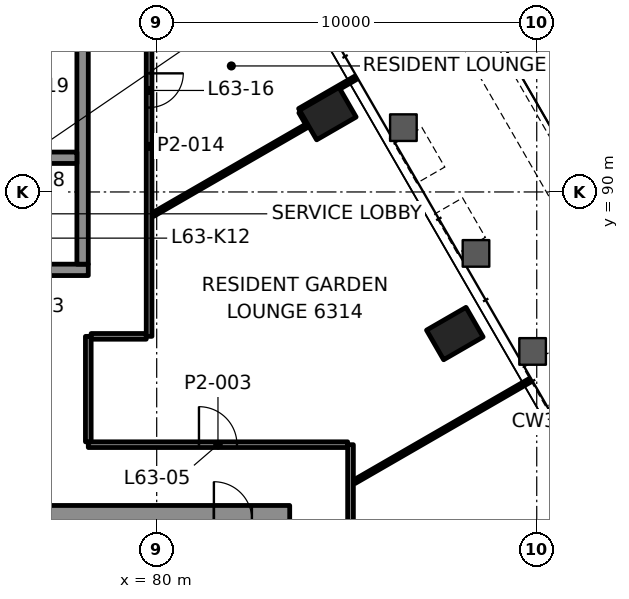
"""IFC4 building model, lengths in metres.
Left out: names, types, materials, properties, quantities, classifications, styles, units other than length and angle.
Written with IfcOpenShell. Run it as: python <this file> out.ifc"""

import sys

from ifc_helpers import new_model, si_unit, direction, frame, frame_2d, origin, origin_2d, place, context, subcontext, project, spatial, rectangle, hollow_rectangle, extrude, element, fill, save


model = new_model("IFC4")
c1 = context("Model", 3, precision=1e-05, world=origin(), true_north=direction((0.0, 1.0)))
c2 = subcontext(c1, "Body", "Model", "MODEL_VIEW")
j1 = project(units=[si_unit("LENGTHUNIT", "METRE"), si_unit("PLANEANGLEUNIT", "RADIAN")], contexts=[c1])
p1 = place(None, origin())
s1 = spatial("IfcSite", under=j1, at=p1, CompositionType="ELEMENT")
p2 = place(p1, origin())
s2 = spatial("IfcBuilding", under=s1, at=p2, CompositionType="ELEMENT")
p3 = place(p2, frame((0.0, 0.0, 267.1)))
s3 = spatial("IfcBuildingStorey", under=s2, at=p3, CompositionType="ELEMENT", Elevation=267.1)
for number, where, z_axis, x_axis in (
    (1, (87.844, 86.274, -0.0), (0.0, 0.0, 1.0), (-0.5, 0.866, 0.0)),
    (2, (84.503, 92.062, -0.0), (0.0, 0.0, 1.0), (-0.5, 0.866, 0.0)),
):
    element("IfcColumn", number, at=place(p3, frame(where, z_axis=z_axis, x_axis=x_axis)), inside=s3, PredefinedType="COLUMN", context=c2, shape_type="SweptSolid", body=[
        extrude(hollow_rectangle(XDim=0.9, YDim=1.2, WallThickness=0.06, at=origin_2d()), origin(), (0.0, 0.0, 1.0), 3.5),
    ])
p4 = place(p3, frame((66.5, 81.375, 0.0), z_axis=(0.0, 0.0, 1.0), x_axis=(1.0, 0.0, 0.0)))
e3 = element("IfcWall", 3, at=p4, inside=s3, PredefinedType="SHEAR", context=c2, shape_type="SweptSolid", body=[
    extrude(rectangle(XDim=17.0, YDim=0.75, at=frame_2d((8.5, 0.0))), origin(), (0.0, 0.0, 1.0), 3.3),
])
p5 = place(p4, frame((1.195, 0.0, 0.0)))
e4 = element("IfcOpeningElement", 4, at=p5, cuts=e3, PredefinedType="OPENING", context=c2, shape_type="SweptSolid", body=[
    extrude(rectangle(XDim=1.0, YDim=2.1, at=frame_2d((0.5, 1.05))), frame((0.0, 0.385, 0.0), z_axis=(0.0, -1.0, 0.0), x_axis=(1.0, 0.0, 0.0)), (0.0, 0.0, 1.0), 0.77),
])
p6 = place(p4, frame((15.005, 0.0, 0.0)))
e5 = element("IfcOpeningElement", 5, at=p6, cuts=e3, PredefinedType="OPENING", context=c2, shape_type="SweptSolid", body=[
    extrude(rectangle(XDim=1.0, YDim=2.1, at=frame_2d((0.5, 1.05))), frame((0.0, 0.385, 0.0), z_axis=(0.0, -1.0, 0.0), x_axis=(1.0, 0.0, 0.0)), (0.0, 0.0, 1.0), 0.77),
])
p7 = place(p4, frame((8.15, 0.0, 0.0)))
e6 = element("IfcOpeningElement", 6, at=p7, cuts=e3, PredefinedType="OPENING", context=c2, shape_type="SweptSolid", body=[
    extrude(rectangle(XDim=0.9, YDim=2.1, at=frame_2d((0.45, 1.05))), frame((0.0, 0.385, 0.0), z_axis=(0.0, -1.0, 0.0), x_axis=(1.0, 0.0, 0.0)), (0.0, 0.0, 1.0), 0.77),
])
p8 = place(p3, frame((71.8, 87.95, 0.0), z_axis=(0.0, 0.0, 1.0), x_axis=(1.0, 0.0, 0.0)))
e7 = element("IfcWall", 7, at=p8, inside=s3, PredefinedType="SHEAR", context=c2, shape_type="SweptSolid", body=[
    extrude(rectangle(XDim=6.4, YDim=0.3, at=frame_2d((3.2, 0.0))), origin(), (0.0, 0.0, 1.0), 3.3),
])
p9 = place(p8, frame((1.325, 0.0, 0.0)))
e8 = element("IfcOpeningElement", 8, at=p9, cuts=e7, PredefinedType="OPENING", context=c2, shape_type="SweptSolid", body=[
    extrude(rectangle(XDim=1.0, YDim=2.1, at=frame_2d((0.5, 1.05))), frame((0.0, 0.16, 0.0), z_axis=(0.0, -1.0, 0.0), x_axis=(1.0, 0.0, 0.0)), (0.0, 0.0, 1.0), 0.32),
])
p10 = place(p8, frame((4.125, 0.0, 0.0)))
e9 = element("IfcOpeningElement", 9, at=p10, cuts=e7, PredefinedType="OPENING", context=c2, shape_type="SweptSolid", body=[
    extrude(rectangle(XDim=1.2, YDim=2.1, at=frame_2d((0.6, 1.05))), frame((0.0, 0.16, 0.0), z_axis=(0.0, -1.0, 0.0), x_axis=(1.0, 0.0, 0.0)), (0.0, 0.0, 1.0), 0.32),
])
p11 = place(p3, frame((78.05, 88.1, 0.0), z_axis=(0.0, 0.0, 1.0), x_axis=(0.0, 1.0, 0.0)))
e10 = element("IfcWall", 10, at=p11, inside=s3, PredefinedType="SHEAR", context=c2, shape_type="SweptSolid", body=[
    extrude(rectangle(XDim=6.2, YDim=0.3, at=frame_2d((3.1, 0.0))), origin(), (0.0, 0.0, 1.0), 3.3),
])
p12 = place(p3, frame((75.3, 90.9, 0.0), z_axis=(0.0, 0.0, 1.0), x_axis=(1.0, 0.0, 0.0)))
e11 = element("IfcWall", 11, at=p12, inside=s3, PredefinedType="SHEAR", context=c2, shape_type="SweptSolid", body=[
    extrude(rectangle(XDim=2.6, YDim=0.3, at=frame_2d((1.3, 0.0))), origin(), (0.0, 0.0, 1.0), 3.3),
])
p13 = place(p12, frame((0.675, 0.0, 0.0)))
e12 = element("IfcOpeningElement", 12, at=p13, cuts=e11, PredefinedType="OPENING", context=c2, shape_type="SweptSolid", body=[
    extrude(rectangle(XDim=1.1, YDim=2.1, at=frame_2d((0.55, 1.05))), frame((0.0, 0.16, 0.0), z_axis=(0.0, -1.0, 0.0), x_axis=(1.0, 0.0, 0.0)), (0.0, 0.0, 1.0), 0.32),
])
p14 = place(p3, frame((78.2, 83.35, 0.0), z_axis=(0.0, 0.0, 1.0), x_axis=(1.0, 0.0, 0.0)))
e13 = element("IfcWall", 13, at=p14, inside=s3, PredefinedType="PARTITIONING", context=c2, shape_type="SweptSolid", body=[
    extrude(rectangle(XDim=6.824, YDim=0.15, at=frame_2d((3.412, 0.0))), origin(), (0.0, 0.0, 1.0), 2.7),
])
p15 = place(p14, frame((2.912, 0.0, 0.0)))
e14 = element("IfcOpeningElement", 14, at=p15, cuts=e13, PredefinedType="OPENING", context=c2, shape_type="SweptSolid", body=[
    extrude(rectangle(XDim=1.0, YDim=2.1, at=frame_2d((0.5, 1.05))), frame((0.0, 0.085, 0.0), z_axis=(0.0, -1.0, 0.0), x_axis=(1.0, 0.0, 0.0)), (0.0, 0.0, 1.0), 0.17),
])
p16 = place(p3, frame((78.275, 86.2, 0.0), z_axis=(0.0, 0.0, 1.0), x_axis=(1.0, 0.0, 0.0)))
e15 = element("IfcWall", 15, at=p16, inside=s3, PredefinedType="PARTITIONING", context=c2, shape_type="SweptSolid", body=[
    extrude(rectangle(XDim=1.45, YDim=0.15, at=frame_2d((0.725, 0.0))), origin(), (0.0, 0.0, 1.0), 2.7),
])
p17 = place(p3, frame((85.201, 82.375, 0.0), z_axis=(0.0, 0.0, 1.0), x_axis=(0.866025682925, 0.499999516514, 0.0)))
e16 = element("IfcWall", 16, at=p17, inside=s3, PredefinedType="PARTITIONING", context=c2, shape_type="SweptSolid", body=[
    extrude(rectangle(XDim=5.339, YDim=0.1, at=frame_2d((2.67, 0.0))), origin(), (0.0, 0.0, 1.0), 2.688),
])
p18 = place(p3, frame((79.901, 89.404, 0.0), z_axis=(0.0, 0.0, 1.0), x_axis=(0.866026044032, 0.499998891056, 0.0)))
e17 = element("IfcWall", 17, at=p18, inside=s3, PredefinedType="PARTITIONING", context=c2, shape_type="SweptSolid", body=[
    extrude(rectangle(XDim=4.714, YDim=0.1, at=frame_2d((2.357, 0.0))), origin(), (0.0, 0.0, 1.0), 2.7),
])
p19 = place(p3, frame((83.759, 92.151, 0.0), z_axis=(0.0, 0.0, 1.0), x_axis=(0.865979829179, 0.500078929226, 0.0)))
e18 = element("IfcWall", 18, at=p19, inside=s3, PredefinedType="PARTITIONING", context=c2, shape_type="SweptSolid", body=[
    extrude(rectangle(XDim=1.699, YDim=0.1, at=frame_2d((0.85, 0.0))), origin(), (0.0, 0.0, 1.0), 2.7),
])
p20 = place(p3, frame((85.1, 83.35, 0.0), z_axis=(0.0, 0.0, 1.0), x_axis=(0.0, -1.0, 0.0)))
e19 = element("IfcWall", 19, at=p20, inside=s3, PredefinedType="PARTITIONING", context=c2, shape_type="SweptSolid", body=[
    extrude(rectangle(XDim=13.055, YDim=0.15, at=frame_2d((6.527, 0.0))), origin(), (0.0, 0.0, 1.0), 2.7),
])
p21 = place(p20, frame((5.579, 0.0, 0.0)))
e20 = element("IfcOpeningElement", 20, at=p21, cuts=e19, PredefinedType="OPENING", context=c2, shape_type="SweptSolid", body=[
    extrude(rectangle(XDim=1.0, YDim=2.1, at=frame_2d((0.5, 1.05))), frame((0.0, 0.085, 0.0), z_axis=(0.0, -1.0, 0.0), x_axis=(1.0, 0.0, 0.0)), (0.0, 0.0, 1.0), 0.17),
])
p22 = place(p20, frame((11.488, 0.0, 0.0)))
e21 = element("IfcOpeningElement", 21, at=p22, cuts=e19, PredefinedType="OPENING", context=c2, shape_type="SweptSolid", body=[
    extrude(rectangle(XDim=1.0, YDim=2.1, at=frame_2d((0.5, 1.05))), frame((0.0, 0.085, 0.0), z_axis=(0.0, -1.0, 0.0), x_axis=(1.0, 0.0, 0.0)), (0.0, 0.0, 1.0), 0.17),
])
p23 = place(p3, frame((79.8, 96.199, 0.0), z_axis=(0.0, 0.0, 1.0), x_axis=(0.0, -1.0, 0.0)))
e22 = element("IfcWall", 22, at=p23, inside=s3, PredefinedType="PARTITIONING", context=c2, shape_type="SweptSolid", body=[
    extrude(rectangle(XDim=9.999, YDim=0.15, at=frame_2d((5.0, 0.0))), origin(), (0.0, 0.0, 1.0), 2.7),
])
p24 = place(p23, frame((3.078, 0.0, 0.0)))
e23 = element("IfcOpeningElement", 23, at=p24, cuts=e22, PredefinedType="OPENING", context=c2, shape_type="SweptSolid", body=[
    extrude(rectangle(XDim=0.9, YDim=2.1, at=frame_2d((0.45, 1.05))), frame((0.0, 0.085, 0.0), z_axis=(0.0, -1.0, 0.0), x_axis=(1.0, 0.0, 0.0)), (0.0, 0.0, 1.0), 0.17),
])
p25 = place(p3, frame((78.2, 83.425, 0.0), z_axis=(0.0, 0.0, 1.0), x_axis=(0.0, 1.0, 0.0)))
e24 = element("IfcWall", 24, at=p25, inside=s3, PredefinedType="PARTITIONING", context=c2, shape_type="SweptSolid", body=[
    extrude(rectangle(XDim=2.775, YDim=0.15, at=frame_2d((1.387, 0.0))), origin(), (0.0, 0.0, 1.0), 2.697),
])
p26 = place(p3, frame((83.954, 91.813, 0.0), z_axis=(0.0, 0.0, 1.0), x_axis=(-0.499618727529, 0.866245419672, 0.0)))
e25 = element("IfcWall", 25, at=p26, inside=s3, PredefinedType="PARTITIONING", context=c2, shape_type="SweptSolid", body=[
    extrude(rectangle(XDim=0.34, YDim=0.1, at=frame_2d((0.17, 0.0))), origin(), (0.0, 0.0, 1.0), 2.7),
])
p27 = place(p3, frame((105.682, 64.079, 0.0), z_axis=(0.0, 0.0, 1.0), x_axis=(-0.500001689899, 0.866024428119, 0.0)))
e26 = element("IfcWall", 26, at=p27, inside=s3, PredefinedType="SOLIDWALL", context=c2, shape_type="SweptSolid", body=[
    extrude(rectangle(XDim=49.597, YDim=0.8, at=frame_2d((24.799, 0.0))), origin(), (0.0, 0.0, 1.0), 0.9),
])
p28 = place(p15, origin())
e27 = element("IfcDoor", 27, at=p28, inside=s3, OperationType="SINGLE_SWING_LEFT", PredefinedType="DOOR", context=c2, shape_type="SweptSolid", body=[
    extrude(rectangle(XDim=1.0, YDim=2.1, at=frame_2d((0.5, 1.05))), frame((0.0, 0.025, 0.0), z_axis=(0.0, -1.0, 0.0), x_axis=(1.0, 0.0, 0.0)), (0.0, 0.0, 1.0), 0.05),
])
fill(e14, e27)
p29 = place(p24, origin())
e28 = element("IfcDoor", 28, at=p29, inside=s3, OperationType="SINGLE_SWING_LEFT", PredefinedType="DOOR", context=c2, shape_type="SweptSolid", body=[
    extrude(rectangle(XDim=0.9, YDim=2.1, at=frame_2d((0.45, 1.05))), frame((0.0, 0.025, 0.0), z_axis=(0.0, -1.0, 0.0), x_axis=(1.0, 0.0, 0.0)), (0.0, 0.0, 1.0), 0.05),
])
fill(e23, e28)
p30 = place(p6, origin())
e29 = element("IfcDoor", 29, at=p30, inside=s3, OperationType="SINGLE_SWING_LEFT", PredefinedType="DOOR", context=c2, shape_type="SweptSolid", body=[
    extrude(rectangle(XDim=1.0, YDim=2.1, at=frame_2d((0.5, 1.05))), frame((0.0, 0.095, 0.0), z_axis=(0.0, -1.0, 0.0), x_axis=(1.0, 0.0, 0.0)), (0.0, 0.0, 1.0), 0.19),
])
fill(e5, e29)
save(model, sys.argv[1])
